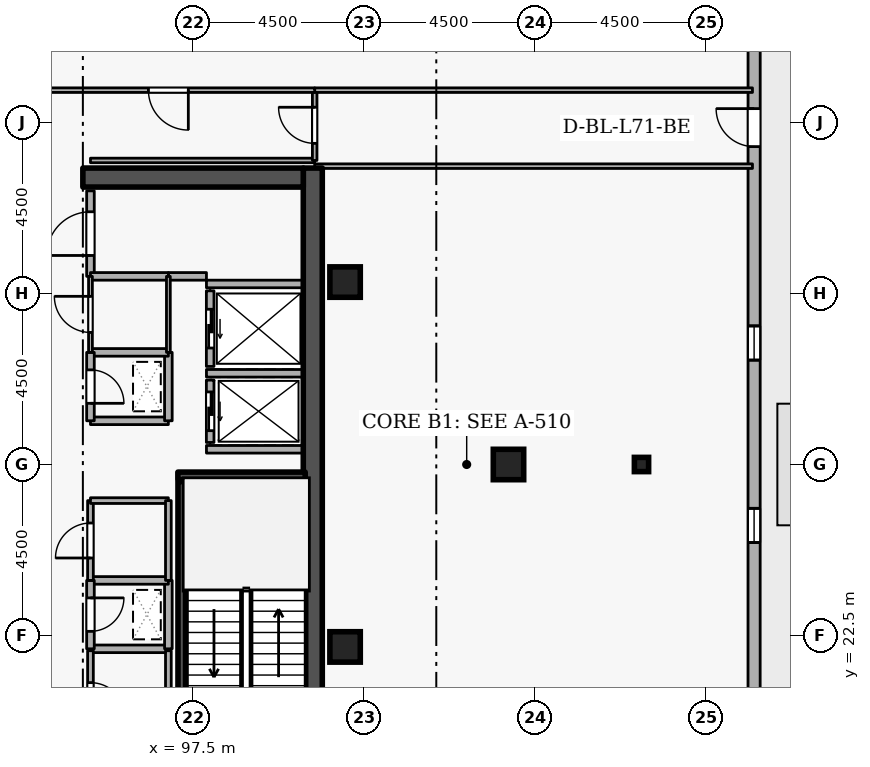
"""IFC4 building model, lengths in metres.
Left out: names, types, materials, properties, quantities, classifications, styles, units other than length and angle.
Written with IfcOpenShell. Run it as: python <this file> out.ifc"""

import sys

from ifc_helpers import new_model, si_unit, direction, frame, frame_2d, origin, origin_2d, place, context, subcontext, project, spatial, rectangle, i_section, extrude, element, fill, save


model = new_model("IFC4")
c1 = context("Model", 3, precision=1e-05, world=origin(), true_north=direction((0.0, 1.0)))
c2 = subcontext(c1, "Body", "Model", "MODEL_VIEW")
j1 = project(units=[si_unit("LENGTHUNIT", "METRE"), si_unit("PLANEANGLEUNIT", "RADIAN")], contexts=[c1])
p1 = place(None, origin())
s1 = spatial("IfcSite", under=j1, at=p1, CompositionType="ELEMENT")
p2 = place(p1, origin())
s2 = spatial("IfcBuilding", under=s1, at=p2, CompositionType="ELEMENT")
p3 = place(p2, frame((0.0, 0.0, 265.5)))
s3 = spatial("IfcBuildingStorey", under=s2, at=p3, CompositionType="ELEMENT", Elevation=265.5)
p4 = place(p3, frame((100.65, 19.2, 0.0), z_axis=(0.0, 0.0, 1.0), x_axis=(0.0, 1.0, 0.0)))
e1 = element("IfcWall", 1, at=p4, inside=s3, PredefinedType="SHEAR", context=c2, shape_type="SweptSolid", body=[
    extrude(rectangle(XDim=15.6, YDim=0.5, at=frame_2d((7.8, 0.0))), origin(), (0.0, 0.0, 1.0), 3.6),
])
p5 = place(p3, frame((94.6, 34.55, 0.0), z_axis=(0.0, 0.0, 1.0), x_axis=(1.0, 0.0, 0.0)))
e2 = element("IfcWall", 2, at=p5, inside=s3, PredefinedType="SHEAR", context=c2, shape_type="SweptSolid", body=[
    extrude(rectangle(XDim=5.8, YDim=0.5, at=frame_2d((2.9, 0.0))), origin(), (0.0, 0.0, 1.0), 3.6),
])
for number, where, z_axis, x_axis in (
    (3, (105.8, 27.0, 0.0), (0.0, 0.0, 1.0), (1.0, 0.0, 0.0)),
    (4, (101.5, 22.2, 0.0), (0.0, 0.0, 1.0), (1.0, 0.0, 0.0)),
    (5, (101.5, 31.8, 0.0), (0.0, 0.0, 1.0), (1.0, 0.0, 0.0)),
):
    element("IfcColumn", number, at=place(p3, frame(where, z_axis=z_axis, x_axis=x_axis)), inside=s3, PredefinedType="COLUMN", context=c2, shape_type="SweptSolid", body=[
        extrude(rectangle(XDim=0.8, YDim=0.8, at=origin_2d()), origin(), (0.0, 0.0, 1.0), 3.6),
    ])
p6 = place(p3, frame((109.3, 27.0, 0.0), z_axis=(0.0, 0.0, 1.0), x_axis=(1.0, 0.0, 0.0)))
e6 = element("IfcColumn", 6, at=p6, inside=s3, PredefinedType="COLUMN", context=c2, shape_type="SweptSolid", body=[
    extrude(i_section(OverallWidth=0.375, OverallDepth=0.375, WebThickness=0.017, FlangeThickness=0.027, FilletRadius=0.015, at=origin_2d()), origin(), (0.0, 0.0, 1.0), 3.6),
])
p7 = place(p3, frame((112.262, 12.646, 0.0), z_axis=(0.0, 0.0, 1.0), x_axis=(7.5574884e-05, 0.999999997144, 0.0)))
e7 = element("IfcWall", 7, at=p7, inside=s3, PredefinedType="STANDARD", context=c2, shape_type="SweptSolid", body=[
    extrude(rectangle(XDim=35.535, YDim=0.32, at=frame_2d((17.768, 0.0))), origin(), (0.0, 0.0, 1.0), 2.7),
])
p8 = place(p7, frame((22.718, 0.0, 0.0)))
e8 = element("IfcOpeningElement", 8, at=p8, cuts=e7, PredefinedType="OPENING", context=c2, shape_type="SweptSolid", body=[
    extrude(rectangle(XDim=1.0, YDim=2.08, at=frame_2d((0.5, 1.04))), frame((0.0, 0.17, 0.0), z_axis=(0.0, -1.0, 0.0), x_axis=(1.0, 0.0, 0.0)), (0.0, 0.0, 1.0), 0.34),
])
p9 = place(p7, frame((2.7, 0.0, 0.72)))
e9 = element("IfcOpeningElement", 9, at=p9, cuts=e7, PredefinedType="OPENING", context=c2, shape_type="SweptSolid", body=[
    extrude(rectangle(XDim=0.9, YDim=1.75, at=frame_2d((0.45, 0.875))), frame((0.0, 0.17, 0.0), z_axis=(0.0, -1.0, 0.0), x_axis=(1.0, 0.0, 0.0)), (0.0, 0.0, 1.0), 0.34),
])
p10 = place(p7, frame((7.5, 0.0, 0.72)))
e10 = element("IfcOpeningElement", 10, at=p10, cuts=e7, PredefinedType="OPENING", context=c2, shape_type="SweptSolid", body=[
    extrude(rectangle(XDim=0.9, YDim=1.75, at=frame_2d((0.45, 0.875))), frame((0.0, 0.17, 0.0), z_axis=(0.0, -1.0, 0.0), x_axis=(1.0, 0.0, 0.0)), (0.0, 0.0, 1.0), 0.34),
])
p11 = place(p7, frame((12.3, 0.0, 0.72)))
e11 = element("IfcOpeningElement", 11, at=p11, cuts=e7, PredefinedType="OPENING", context=c2, shape_type="SweptSolid", body=[
    extrude(rectangle(XDim=0.9, YDim=1.75, at=frame_2d((0.45, 0.875))), frame((0.0, 0.17, 0.0), z_axis=(0.0, -1.0, 0.0), x_axis=(1.0, 0.0, 0.0)), (0.0, 0.0, 1.0), 0.34),
])
p12 = place(p7, frame((17.1, 0.0, 0.72)))
e12 = element("IfcOpeningElement", 12, at=p12, cuts=e7, PredefinedType="OPENING", context=c2, shape_type="SweptSolid", body=[
    extrude(rectangle(XDim=0.9, YDim=1.75, at=frame_2d((0.45, 0.875))), frame((0.0, 0.17, 0.0), z_axis=(0.0, -1.0, 0.0), x_axis=(1.0, 0.0, 0.0)), (0.0, 0.0, 1.0), 0.34),
])
p13 = place(p7, frame((26.7, 0.0, 0.72)))
e13 = element("IfcOpeningElement", 13, at=p13, cuts=e7, PredefinedType="OPENING", context=c2, shape_type="SweptSolid", body=[
    extrude(rectangle(XDim=0.9, YDim=1.75, at=frame_2d((0.45, 0.875))), frame((0.0, 0.17, 0.0), z_axis=(0.0, -1.0, 0.0), x_axis=(1.0, 0.0, 0.0)), (0.0, 0.0, 1.0), 0.34),
])
p14 = place(p7, frame((31.5, 0.0, 0.72)))
e14 = element("IfcOpeningElement", 14, at=p14, cuts=e7, PredefinedType="OPENING", context=c2, shape_type="SweptSolid", body=[
    extrude(rectangle(XDim=0.9, YDim=1.75, at=frame_2d((0.45, 0.875))), frame((0.0, 0.17, 0.0), z_axis=(0.0, -1.0, 0.0), x_axis=(1.0, 0.0, 0.0)), (0.0, 0.0, 1.0), 0.34),
])
p15 = place(p3, frame((97.95, 29.22, 0.0), z_axis=(0.0, 0.0, 1.0), x_axis=(0.0, -1.0, 0.0)))
e15 = element("IfcWall", 15, at=p15, inside=s3, PredefinedType="STANDARD", context=c2, shape_type="SweptSolid", body=[
    extrude(rectangle(XDim=1.64, YDim=0.2, at=frame_2d((0.82, 0.0))), origin(), (0.0, 0.0, 1.0), 3.34),
])
p16 = place(p15, frame((0.31, 0.0, 0.0)))
e16 = element("IfcOpeningElement", 16, at=p16, cuts=e15, PredefinedType="OPENING", context=c2, shape_type="SweptSolid", body=[
    extrude(rectangle(XDim=1.02, YDim=2.06, at=frame_2d((0.51, 1.03))), frame((0.0, 0.11, 0.0), z_axis=(0.0, -1.0, 0.0), x_axis=(1.0, 0.0, 0.0)), (0.0, 0.0, 1.0), 0.22),
])
p17 = place(p3, frame((97.95, 31.57, 0.0), z_axis=(0.0, 0.0, 1.0), x_axis=(0.0, -1.0, 0.0)))
e17 = element("IfcWall", 17, at=p17, inside=s3, PredefinedType="STANDARD", context=c2, shape_type="SweptSolid", body=[
    extrude(rectangle(XDim=1.99, YDim=0.2, at=frame_2d((0.995, 0.0))), origin(), (0.0, 0.0, 1.0), 3.34),
])
p18 = place(p17, frame((0.485, 0.0, 0.0)))
e18 = element("IfcOpeningElement", 18, at=p18, cuts=e17, PredefinedType="OPENING", context=c2, shape_type="SweptSolid", body=[
    extrude(rectangle(XDim=1.02, YDim=2.06, at=frame_2d((0.51, 1.03))), frame((0.0, 0.11, 0.0), z_axis=(0.0, -1.0, 0.0), x_axis=(1.0, 0.0, 0.0)), (0.0, 0.0, 1.0), 0.22),
])
for number, where, z_axis, x_axis in (
    (19, (97.852, 29.4, 0.0), (0.0, 0.0, 1.0), (1.0, 0.0, 0.0)),
    (20, (97.852, 27.4, 0.0), (0.0, 0.0, 1.0), (1.0, 0.0, 0.0)),
    (21, (97.852, 31.75, 0.0), (0.0, 0.0, 1.0), (1.0, 0.0, 0.0)),
):
    element("IfcWall", number, at=place(p3, frame(where, z_axis=z_axis, x_axis=x_axis)), inside=s3, PredefinedType="STANDARD", context=c2, shape_type="SweptSolid", body=[
        extrude(rectangle(XDim=2.536, YDim=0.2, at=frame_2d((1.268, 0.0))), origin(), (0.0, 0.0, 1.0), 3.34),
    ])
p19 = place(p3, frame((97.1, 26.7, 0.0), z_axis=(0.0, 0.0, 1.0), x_axis=(1.0, 0.0, 0.0)))
e22 = element("IfcWall", 22, at=p19, inside=s3, PredefinedType="SHEAR", context=c2, shape_type="SweptSolid", body=[
    extrude(rectangle(XDim=3.35, YDim=0.2, at=frame_2d((1.675, 0.0))), origin(), (0.0, 0.0, 1.0), 3.6),
])
p20 = place(p3, frame((97.203, 26.55, 0.0), z_axis=(0.0, 0.0, 1.0), x_axis=(0.0, -1.0, 0.0)))
e23 = element("IfcWall", 23, at=p20, inside=s3, PredefinedType="SHEAR", context=c2, shape_type="SweptSolid", body=[
    extrude(rectangle(XDim=7.1, YDim=0.2, at=frame_2d((3.55, 0.0))), origin(), (0.0, 0.0, 1.0), 3.6),
])
p21 = place(p3, frame((94.8, 28.15, 0.0), z_axis=(0.0, 0.0, 1.0), x_axis=(1.0, 0.0, 0.0)))
e24 = element("IfcWall", 24, at=p21, inside=s3, PredefinedType="STANDARD", context=c2, shape_type="SweptSolid", body=[
    extrude(rectangle(XDim=2.05, YDim=0.2, at=frame_2d((1.025, 0.0))), origin(), (0.0, 0.0, 1.0), 3.34),
])
p22 = place(p3, frame((96.85, 28.15, 0.0), z_axis=(0.0, 0.0, 1.0), x_axis=(0.0, 1.0, 0.0)))
e25 = element("IfcWall", 25, at=p22, inside=s3, PredefinedType="STANDARD", context=c2, shape_type="SweptSolid", body=[
    extrude(rectangle(XDim=1.8, YDim=0.2, at=frame_2d((0.9, 0.0))), origin(), (0.0, 0.0, 1.0), 3.34),
])
p23 = place(p3, frame((96.85, 29.95, 0.0), z_axis=(0.0, 0.0, 1.0), x_axis=(-1.0, 0.0, 0.0)))
e26 = element("IfcWall", 26, at=p23, inside=s3, PredefinedType="STANDARD", context=c2, shape_type="SweptSolid", body=[
    extrude(rectangle(XDim=2.05, YDim=0.2, at=frame_2d((1.025, 0.0))), origin(), (0.0, 0.0, 1.0), 3.34),
])
p24 = place(p3, frame((94.8, 29.95, 0.0), z_axis=(0.0, 0.0, 1.0), x_axis=(0.0, -1.0, 0.0)))
e27 = element("IfcWall", 27, at=p24, inside=s3, PredefinedType="STANDARD", context=c2, shape_type="SweptSolid", body=[
    extrude(rectangle(XDim=1.8, YDim=0.2, at=frame_2d((0.9, 0.0))), origin(), (0.0, 0.0, 1.0), 3.34),
])
p25 = place(p24, frame((0.46, 0.0, 0.0)))
e28 = element("IfcOpeningElement", 28, at=p25, cuts=e27, PredefinedType="OPENING", context=c2, shape_type="SweptSolid", body=[
    extrude(rectangle(XDim=0.88, YDim=2.04, at=frame_2d((0.44, 1.02))), frame((0.0, 0.11, 0.0), z_axis=(0.0, -1.0, 0.0), x_axis=(1.0, 0.0, 0.0)), (0.0, 0.0, 1.0), 0.22),
])
p26 = place(p3, frame((94.8, 22.15, 0.0), z_axis=(0.0, 0.0, 1.0), x_axis=(1.0, 0.0, 0.0)))
e29 = element("IfcWall", 29, at=p26, inside=s3, PredefinedType="STANDARD", context=c2, shape_type="SweptSolid", body=[
    extrude(rectangle(XDim=2.05, YDim=0.2, at=frame_2d((1.025, 0.0))), origin(), (0.0, 0.0, 1.0), 3.34),
])
p27 = place(p3, frame((96.85, 22.15, 0.0), z_axis=(0.0, 0.0, 1.0), x_axis=(0.0, 1.0, 0.0)))
e30 = element("IfcWall", 30, at=p27, inside=s3, PredefinedType="STANDARD", context=c2, shape_type="SweptSolid", body=[
    extrude(rectangle(XDim=1.8, YDim=0.2, at=frame_2d((0.9, 0.0))), origin(), (0.0, 0.0, 1.0), 3.34),
])
p28 = place(p3, frame((96.85, 23.95, 0.0), z_axis=(0.0, 0.0, 1.0), x_axis=(-1.0, 0.0, 0.0)))
e31 = element("IfcWall", 31, at=p28, inside=s3, PredefinedType="STANDARD", context=c2, shape_type="SweptSolid", body=[
    extrude(rectangle(XDim=2.05, YDim=0.2, at=frame_2d((1.025, 0.0))), origin(), (0.0, 0.0, 1.0), 3.34),
])
p29 = place(p3, frame((94.8, 23.95, 0.0), z_axis=(0.0, 0.0, 1.0), x_axis=(0.0, -1.0, 0.0)))
e32 = element("IfcWall", 32, at=p29, inside=s3, PredefinedType="STANDARD", context=c2, shape_type="SweptSolid", body=[
    extrude(rectangle(XDim=1.8, YDim=0.2, at=frame_2d((0.9, 0.0))), origin(), (0.0, 0.0, 1.0), 3.34),
])
p30 = place(p29, frame((0.46, 0.0, 0.0)))
e33 = element("IfcOpeningElement", 33, at=p30, cuts=e32, PredefinedType="OPENING", context=c2, shape_type="SweptSolid", body=[
    extrude(rectangle(XDim=0.88, YDim=2.04, at=frame_2d((0.44, 1.02))), frame((0.0, 0.11, 0.0), z_axis=(0.0, -1.0, 0.0), x_axis=(1.0, 0.0, 0.0)), (0.0, 0.0, 1.0), 0.22),
])
p31 = place(p3, frame((94.8, 31.95, 0.0), z_axis=(0.0, 0.0, 1.0), x_axis=(0.0, 1.0, 0.0)))
e34 = element("IfcWall", 34, at=p31, inside=s3, PredefinedType="STANDARD", context=c2, shape_type="SweptSolid", body=[
    extrude(rectangle(XDim=2.25, YDim=0.2, at=frame_2d((1.125, 0.0))), origin(), (0.0, 0.0, 1.0), 3.34),
])
p32 = place(p31, frame((0.55, 0.0, 0.0)))
e35 = element("IfcOpeningElement", 35, at=p32, cuts=e34, PredefinedType="OPENING", context=c2, shape_type="SweptSolid", body=[
    extrude(rectangle(XDim=1.15, YDim=2.1, at=frame_2d((0.575, 1.05))), frame((0.0, 0.11, 0.0), z_axis=(0.0, -1.0, 0.0), x_axis=(1.0, 0.0, 0.0)), (0.0, 0.0, 1.0), 0.22),
])
p33 = place(p3, frame((97.852, 31.95, 0.0), z_axis=(0.0, 0.0, 1.0), x_axis=(-1.0, 0.0, 0.0)))
e36 = element("IfcWall", 36, at=p33, inside=s3, PredefinedType="STANDARD", context=c2, shape_type="SweptSolid", body=[
    extrude(rectangle(XDim=1.002, YDim=0.2, at=frame_2d((0.501, 0.0))), origin(), (0.0, 0.0, 1.0), 3.34),
])
p34 = place(p3, frame((96.85, 31.95, 0.0), z_axis=(0.0, 0.0, 1.0), x_axis=(-1.0, 0.0, 0.0)))
e37 = element("IfcWall", 37, at=p34, inside=s3, PredefinedType="STANDARD", context=c2, shape_type="SweptSolid", body=[
    extrude(rectangle(XDim=2.05, YDim=0.2, at=frame_2d((1.025, 0.0))), origin(), (0.0, 0.0, 1.0), 3.34),
])
p35 = place(p3, frame((96.85, 19.5, 0.0), z_axis=(0.0, 0.0, 1.0), x_axis=(0.0, 1.0, 0.0)))
e38 = element("IfcWall", 38, at=p35, inside=s3, PredefinedType="PARTITIONING", context=c2, shape_type="SweptSolid", body=[
    extrude(rectangle(XDim=2.6, YDim=0.15, at=frame_2d((1.3, 0.0))), origin(), (0.0, 0.0, 1.0), 3.34),
])
p36 = place(p3, frame((94.8, 22.1, 0.0), z_axis=(0.0, 0.0, 1.0), x_axis=(0.0, -1.0, 0.0)))
e39 = element("IfcWall", 39, at=p36, inside=s3, PredefinedType="PARTITIONING", context=c2, shape_type="SweptSolid", body=[
    extrude(rectangle(XDim=2.6, YDim=0.15, at=frame_2d((1.3, 0.0))), origin(), (0.0, 0.0, 1.0), 3.34),
])
p37 = place(p36, frame((0.84, 0.0, 0.0)))
e40 = element("IfcOpeningElement", 40, at=p37, cuts=e39, PredefinedType="OPENING", context=c2, shape_type="SweptSolid", body=[
    extrude(rectangle(XDim=0.92, YDim=2.08, at=frame_2d((0.46, 1.04))), frame((0.0, 0.085, 0.0), z_axis=(0.0, -1.0, 0.0), x_axis=(1.0, 0.0, 0.0)), (0.0, 0.0, 1.0), 0.17),
])
p38 = place(p3, frame((94.8, 23.95, 0.0), z_axis=(0.0, 0.0, 1.0), x_axis=(0.0, 1.0, 0.0)))
e41 = element("IfcWall", 41, at=p38, inside=s3, PredefinedType="PARTITIONING", context=c2, shape_type="SweptSolid", body=[
    extrude(rectangle(XDim=2.1, YDim=0.15, at=frame_2d((1.05, 0.0))), origin(), (0.0, 0.0, 1.0), 3.34),
])
p39 = place(p38, frame((0.59, 0.0, 0.0)))
e42 = element("IfcOpeningElement", 42, at=p39, cuts=e41, PredefinedType="OPENING", context=c2, shape_type="SweptSolid", body=[
    extrude(rectangle(XDim=0.92, YDim=2.08, at=frame_2d((0.46, 1.04))), frame((0.0, 0.085, 0.0), z_axis=(0.0, -1.0, 0.0), x_axis=(1.0, 0.0, 0.0)), (0.0, 0.0, 1.0), 0.17),
])
p40 = place(p3, frame((94.8, 26.05, 0.0), z_axis=(0.0, 0.0, 1.0), x_axis=(1.0, 0.0, 0.0)))
e43 = element("IfcWall", 43, at=p40, inside=s3, PredefinedType="PARTITIONING", context=c2, shape_type="SweptSolid", body=[
    extrude(rectangle(XDim=2.05, YDim=0.15, at=frame_2d((1.025, 0.0))), origin(), (0.0, 0.0, 1.0), 3.34),
])
p41 = place(p3, frame((96.85, 26.05, 0.0), z_axis=(0.0, 0.0, 1.0), x_axis=(0.0, -1.0, 0.0)))
e44 = element("IfcWall", 44, at=p41, inside=s3, PredefinedType="PARTITIONING", context=c2, shape_type="SweptSolid", body=[
    extrude(rectangle(XDim=2.1, YDim=0.15, at=frame_2d((1.05, 0.0))), origin(), (0.0, 0.0, 1.0), 3.34),
])
p42 = place(p3, frame((94.8, 29.95, 0.0), z_axis=(0.0, 0.0, 1.0), x_axis=(0.0, 1.0, 0.0)))
e45 = element("IfcWall", 45, at=p42, inside=s3, PredefinedType="PARTITIONING", context=c2, shape_type="SweptSolid", body=[
    extrude(rectangle(XDim=2.0, YDim=0.1, at=frame_2d((1.0, 0.0))), origin(), (0.0, 0.0, 1.0), 3.34),
])
p43 = place(p42, frame((0.525, 0.0, 0.0)))
e46 = element("IfcOpeningElement", 46, at=p43, cuts=e45, PredefinedType="OPENING", context=c2, shape_type="SweptSolid", body=[
    extrude(rectangle(XDim=0.95, YDim=2.1, at=frame_2d((0.475, 1.05))), frame((0.0, 0.06, 0.0), z_axis=(0.0, -1.0, 0.0), x_axis=(1.0, 0.0, 0.0)), (0.0, 0.0, 1.0), 0.12),
])
p44 = place(p3, frame((96.85, 31.95, 0.0), z_axis=(0.0, 0.0, 1.0), x_axis=(0.0, -1.0, 0.0)))
e47 = element("IfcWall", 47, at=p44, inside=s3, PredefinedType="PARTITIONING", context=c2, shape_type="SweptSolid", body=[
    extrude(rectangle(XDim=2.0, YDim=0.1, at=frame_2d((1.0, 0.0))), origin(), (0.0, 0.0, 1.0), 3.34),
])
p45 = place(p3, frame((94.8, 35.0, 0.0), z_axis=(0.0, 0.0, 1.0), x_axis=(1.0, 0.0, 0.0)))
e48 = element("IfcWall", 48, at=p45, inside=s3, PredefinedType="PARTITIONING", context=c2, shape_type="SweptSolid", body=[
    extrude(rectangle(XDim=5.9, YDim=0.12, at=frame_2d((2.95, 0.0))), origin(), (0.0, 0.0, 1.0), 3.34),
])
p46 = place(p3, frame((100.7, 35.0, 0.0), z_axis=(0.0, 0.0, 1.0), x_axis=(0.0, 1.0, 0.0)))
e49 = element("IfcWall", 49, at=p46, inside=s3, PredefinedType="PARTITIONING", context=c2, shape_type="SweptSolid", body=[
    extrude(rectangle(XDim=1.85, YDim=0.12, at=frame_2d((0.925, 0.0))), origin(), (0.0, 0.0, 1.0), 3.34),
])
p47 = place(p46, frame((0.45, 0.0, 0.0)))
e50 = element("IfcOpeningElement", 50, at=p47, cuts=e49, PredefinedType="OPENING", context=c2, shape_type="SweptSolid", body=[
    extrude(rectangle(XDim=0.95, YDim=2.1, at=frame_2d((0.475, 1.05))), frame((0.0, 0.07, 0.0), z_axis=(0.0, -1.0, 0.0), x_axis=(1.0, 0.0, 0.0)), (0.0, 0.0, 1.0), 0.14),
])
for number, where, z_axis, x_axis in (
    (51, (100.7, 36.85, 0.0), (0.0, 0.0, 1.0), (1.0, 0.0, 0.0)),
    (52, (112.22, 34.85, 0.0), (0.0, 0.0, 1.0), (-1.0, 0.0, 0.0)),
):
    element("IfcWall", number, at=place(p3, frame(where, z_axis=z_axis, x_axis=x_axis)), inside=s3, PredefinedType="PARTITIONING", context=c2, shape_type="SweptSolid", body=[
        extrude(rectangle(XDim=11.52, YDim=0.12, at=frame_2d((5.76, 0.0))), origin(), (0.0, 0.0, 1.0), 3.34),
    ])
p48 = place(p3, frame((100.7, 36.85, 0.0), z_axis=(0.0, 0.0, 1.0), x_axis=(-1.0, 0.0, 0.0)))
e53 = element("IfcWall", 53, at=p48, inside=s3, PredefinedType="PARTITIONING", context=c2, shape_type="SweptSolid", body=[
    extrude(rectangle(XDim=7.7, YDim=0.12, at=frame_2d((3.85, 0.0))), origin(), (0.0, 0.0, 1.0), 3.34),
])
p49 = place(p48, frame((3.325, 0.0, 0.0)))
e54 = element("IfcOpeningElement", 54, at=p49, cuts=e53, PredefinedType="OPENING", context=c2, shape_type="SweptSolid", body=[
    extrude(rectangle(XDim=1.05, YDim=2.1, at=frame_2d((0.525, 1.05))), frame((0.0, 0.07, 0.0), z_axis=(0.0, -1.0, 0.0), x_axis=(1.0, 0.0, 0.0)), (0.0, 0.0, 1.0), 0.14),
])
p50 = place(p8, origin())
e55 = element("IfcDoor", 55, at=p50, inside=s3, OperationType="SINGLE_SWING_RIGHT", PredefinedType="DOOR", context=c2, shape_type="SweptSolid", body=[
    extrude(rectangle(XDim=1.0, YDim=2.08, at=frame_2d((0.5, 1.04))), frame((0.0, 0.025, 0.0), z_axis=(0.0, -1.0, 0.0), x_axis=(1.0, 0.0, 0.0)), (0.0, 0.0, 1.0), 0.05),
])
fill(e8, e55)
p51 = place(p11, origin())
e56 = element("IfcWindow", 56, at=p51, inside=s3, PartitioningType="SINGLE_PANEL", PredefinedType="WINDOW", context=c2, shape_type="SweptSolid", body=[
    extrude(rectangle(XDim=0.9, YDim=1.75, at=frame_2d((0.45, 0.875))), frame((0.0, 0.03, 0.0), z_axis=(0.0, -1.0, 0.0), x_axis=(1.0, 0.0, 0.0)), (0.0, 0.0, 1.0), 0.06),
])
fill(e11, e56)
p52 = place(p12, origin())
e57 = element("IfcWindow", 57, at=p52, inside=s3, PartitioningType="SINGLE_PANEL", PredefinedType="WINDOW", context=c2, shape_type="SweptSolid", body=[
    extrude(rectangle(XDim=0.9, YDim=1.75, at=frame_2d((0.45, 0.875))), frame((0.0, 0.03, 0.0), z_axis=(0.0, -1.0, 0.0), x_axis=(1.0, 0.0, 0.0)), (0.0, 0.0, 1.0), 0.06),
])
fill(e12, e57)
p53 = place(p16, origin())
e58 = element("IfcDoor", 58, at=p53, inside=s3, OperationType="SLIDING_TO_LEFT", PredefinedType="DOOR", context=c2, shape_type="SweptSolid", body=[
    extrude(rectangle(XDim=1.02, YDim=2.06, at=frame_2d((0.51, 1.03))), frame((0.0, 0.025, 0.0), z_axis=(0.0, -1.0, 0.0), x_axis=(1.0, 0.0, 0.0)), (0.0, 0.0, 1.0), 0.05),
])
fill(e16, e58)
p54 = place(p18, origin())
e59 = element("IfcDoor", 59, at=p54, inside=s3, OperationType="SLIDING_TO_LEFT", PredefinedType="DOOR", context=c2, shape_type="SweptSolid", body=[
    extrude(rectangle(XDim=1.02, YDim=2.06, at=frame_2d((0.51, 1.03))), frame((0.0, 0.025, 0.0), z_axis=(0.0, -1.0, 0.0), x_axis=(1.0, 0.0, 0.0)), (0.0, 0.0, 1.0), 0.05),
])
fill(e18, e59)
p55 = place(p25, origin())
e60 = element("IfcDoor", 60, at=p55, inside=s3, OperationType="SINGLE_SWING_RIGHT", PredefinedType="DOOR", context=c2, shape_type="SweptSolid", body=[
    extrude(rectangle(XDim=0.88, YDim=2.04, at=frame_2d((0.44, 1.02))), frame((0.0, 0.025, 0.0), z_axis=(0.0, -1.0, 0.0), x_axis=(1.0, 0.0, 0.0)), (0.0, 0.0, 1.0), 0.05),
])
fill(e28, e60)
p56 = place(p30, origin())
e61 = element("IfcDoor", 61, at=p56, inside=s3, OperationType="SINGLE_SWING_LEFT", PredefinedType="DOOR", context=c2, shape_type="SweptSolid", body=[
    extrude(rectangle(XDim=0.88, YDim=2.04, at=frame_2d((0.44, 1.02))), frame((0.0, 0.025, 0.0), z_axis=(0.0, -1.0, 0.0), x_axis=(1.0, 0.0, 0.0)), (0.0, 0.0, 1.0), 0.05),
])
fill(e33, e61)
p57 = place(p37, origin())
e62 = element("IfcDoor", 62, at=p57, inside=s3, OperationType="SINGLE_SWING_RIGHT", PredefinedType="DOOR", context=c2, shape_type="SweptSolid", body=[
    extrude(rectangle(XDim=0.92, YDim=2.08, at=frame_2d((0.46, 1.04))), frame((0.0, 0.025, 0.0), z_axis=(0.0, -1.0, 0.0), x_axis=(1.0, 0.0, 0.0)), (0.0, 0.0, 1.0), 0.05),
])
fill(e40, e62)
p58 = place(p39, origin())
e63 = element("IfcDoor", 63, at=p58, inside=s3, OperationType="SINGLE_SWING_LEFT", PredefinedType="DOOR", context=c2, shape_type="SweptSolid", body=[
    extrude(rectangle(XDim=0.92, YDim=2.08, at=frame_2d((0.46, 1.04))), frame((0.0, 0.025, 0.0), z_axis=(0.0, -1.0, 0.0), x_axis=(1.0, 0.0, 0.0)), (0.0, 0.0, 1.0), 0.05),
])
fill(e42, e63)
p59 = place(p43, origin())
e64 = element("IfcDoor", 64, at=p59, inside=s3, OperationType="SINGLE_SWING_RIGHT", PredefinedType="DOOR", context=c2, shape_type="SweptSolid", body=[
    extrude(rectangle(XDim=0.95, YDim=2.1, at=frame_2d((0.475, 1.05))), frame((0.0, 0.025, 0.0), z_axis=(0.0, -1.0, 0.0), x_axis=(1.0, 0.0, 0.0)), (0.0, 0.0, 1.0), 0.05),
])
fill(e46, e64)
p60 = place(p32, origin())
e65 = element("IfcDoor", 65, at=p60, inside=s3, OperationType="SINGLE_SWING_LEFT", PredefinedType="DOOR", context=c2, shape_type="SweptSolid", body=[
    extrude(rectangle(XDim=1.15, YDim=2.1, at=frame_2d((0.575, 1.05))), frame((0.0, 0.025, 0.0), z_axis=(0.0, -1.0, 0.0), x_axis=(1.0, 0.0, 0.0)), (0.0, 0.0, 1.0), 0.05),
])
fill(e35, e65)
p61 = place(p47, origin())
e66 = element("IfcDoor", 66, at=p61, inside=s3, OperationType="SINGLE_SWING_RIGHT", PredefinedType="DOOR", context=c2, shape_type="SweptSolid", body=[
    extrude(rectangle(XDim=0.95, YDim=2.1, at=frame_2d((0.475, 1.05))), frame((0.0, 0.025, 0.0), z_axis=(0.0, -1.0, 0.0), x_axis=(1.0, 0.0, 0.0)), (0.0, 0.0, 1.0), 0.05),
])
fill(e50, e66)
p62 = place(p49, origin())
e67 = element("IfcDoor", 67, at=p62, inside=s3, OperationType="SINGLE_SWING_LEFT", PredefinedType="DOOR", context=c2, shape_type="SweptSolid", body=[
    extrude(rectangle(XDim=1.05, YDim=2.1, at=frame_2d((0.525, 1.05))), frame((0.0, 0.025, 0.0), z_axis=(0.0, -1.0, 0.0), x_axis=(1.0, 0.0, 0.0)), (0.0, 0.0, 1.0), 0.05),
])
fill(e54, e67)
save(model, sys.argv[1])
